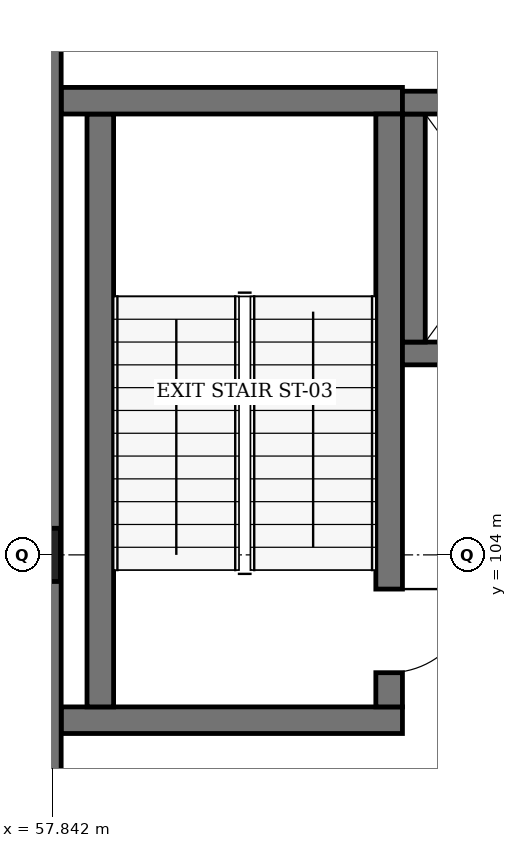
"""IFC4 building model, lengths in metres.
Left out: names, types, materials, properties, quantities, classifications, styles, units other than length and angle.
Written with IfcOpenShell. Run it as: python <this file> out.ifc"""

import sys

from ifc_helpers import new_model, si_unit, direction, frame, frame_2d, origin, origin_2d, place, context, subcontext, project, spatial, rectangle, extrude, element, fill, save


model = new_model("IFC4")
c1 = context("Model", 3, precision=1e-05, world=origin(), true_north=direction((0.0, 1.0)))
c2 = subcontext(c1, "Body", "Model", "MODEL_VIEW")
j1 = project(units=[si_unit("LENGTHUNIT", "METRE"), si_unit("PLANEANGLEUNIT", "RADIAN")], contexts=[c1])
p1 = place(None, origin())
s1 = spatial("IfcSite", under=j1, at=p1, CompositionType="ELEMENT")
p2 = place(p1, origin())
s2 = spatial("IfcBuilding", under=s1, at=p2, CompositionType="ELEMENT")
p3 = place(p2, origin())
s3 = spatial("IfcBuildingStorey", under=s2, at=p3, CompositionType="ELEMENT", Elevation=0.0)
p4 = place(p3, frame((57.6, 104.0, 0.0), z_axis=(0.0, 0.0, 1.0), x_axis=(1.0, 0.0, 0.0)))
e1 = element("IfcColumn", 1, at=p4, inside=s3, PredefinedType="COLUMN", context=c2, shape_type="SweptSolid", body=[
    extrude(rectangle(XDim=0.7, YDim=0.7, at=origin_2d()), origin(), (0.0, 0.0, 1.0), 4.8),
])
p5 = place(p3, frame((62.45, 101.825, 0.0), z_axis=(0.0, 0.0, 1.0), x_axis=(-1.0, 0.0, 0.0)))
e2 = element("IfcWall", 2, at=p5, inside=s3, PredefinedType="SOLIDWALL", context=c2, shape_type="SweptSolid", body=[
    extrude(rectangle(XDim=4.49, YDim=0.35, at=frame_2d((2.245, 0.0))), origin(), (0.0, 0.0, 1.0), 4.8),
])
p6 = place(p3, frame((58.475, 102.0, 0.0), z_axis=(0.0, 0.0, 1.0), x_axis=(0.0, 1.0, 0.0)))
e3 = element("IfcWall", 3, at=p6, inside=s3, PredefinedType="SOLIDWALL", context=c2, shape_type="SweptSolid", body=[
    extrude(rectangle(XDim=7.8, YDim=0.35, at=frame_2d((3.9, 0.0))), origin(), (0.0, 0.0, 1.0), 4.8),
])
p7 = place(p3, frame((57.96, 109.975, 0.0), z_axis=(0.0, 0.0, 1.0), x_axis=(1.0, 0.0, 0.0)))
e4 = element("IfcWall", 4, at=p7, inside=s3, PredefinedType="SOLIDWALL", context=c2, shape_type="SweptSolid", body=[
    extrude(rectangle(XDim=4.49, YDim=0.35, at=frame_2d((2.245, 0.0))), origin(), (0.0, 0.0, 1.0), 4.8),
])
p8 = place(p3, frame((62.275, 109.8, 0.0), z_axis=(0.0, 0.0, 1.0), x_axis=(0.0, -1.0, 0.0)))
e5 = element("IfcWall", 5, at=p8, inside=s3, PredefinedType="SOLIDWALL", context=c2, shape_type="SweptSolid", body=[
    extrude(rectangle(XDim=7.8, YDim=0.35, at=frame_2d((3.9, 0.0))), origin(), (0.0, 0.0, 1.0), 4.8),
])
p9 = place(p8, frame((6.25, 0.0, 0.0)))
e6 = element("IfcOpeningElement", 6, at=p9, cuts=e5, PredefinedType="OPENING", context=c2, shape_type="SweptSolid", body=[
    extrude(rectangle(XDim=1.1, YDim=2.15, at=frame_2d((0.55, 1.075))), frame((0.0, 0.195, 0.0), z_axis=(0.0, -1.0, 0.0), x_axis=(1.0, 0.0, 0.0)), (0.0, 0.0, 1.0), 0.39),
])
p10 = place(p3, frame((65.25, 106.65, 0.0), z_axis=(0.0, 0.0, 1.0), x_axis=(-1.0, 0.0, 0.0)))
e7 = element("IfcWall", 7, at=p10, inside=s3, PredefinedType="SOLIDWALL", context=c2, shape_type="SweptSolid", body=[
    extrude(rectangle(XDim=2.8, YDim=0.3, at=frame_2d((1.4, 0.0))), origin(), (0.0, 0.0, 1.0), 4.8),
])
p11 = place(p10, frame((0.825, 0.0, 0.0)))
e8 = element("IfcOpeningElement", 8, at=p11, cuts=e7, PredefinedType="OPENING", context=c2, shape_type="SweptSolid", body=[
    extrude(rectangle(XDim=1.15, YDim=2.1, at=frame_2d((0.575, 1.05))), frame((0.0, 0.17, 0.0), z_axis=(0.0, -1.0, 0.0), x_axis=(1.0, 0.0, 0.0)), (0.0, 0.0, 1.0), 0.34),
])
p12 = place(p3, frame((62.6, 106.8, 0.0), z_axis=(0.0, 0.0, 1.0), x_axis=(0.0, 1.0, 0.0)))
e9 = element("IfcWall", 9, at=p12, inside=s3, PredefinedType="SOLIDWALL", context=c2, shape_type="SweptSolid", body=[
    extrude(rectangle(XDim=3.0, YDim=0.3, at=frame_2d((1.5, 0.0))), origin(), (0.0, 0.0, 1.0), 4.8),
])
p13 = place(p3, frame((62.45, 109.95, 0.0), z_axis=(0.0, 0.0, 1.0), x_axis=(1.0, 0.0, 0.0)))
e10 = element("IfcWall", 10, at=p13, inside=s3, PredefinedType="SOLIDWALL", context=c2, shape_type="SweptSolid", body=[
    extrude(rectangle(XDim=2.8, YDim=0.3, at=frame_2d((1.4, 0.0))), origin(), (0.0, 0.0, 1.0), 4.8),
])
p14 = place(p3, frame((57.78, 87.8, 0.0), z_axis=(0.0, 0.0, 1.0), x_axis=(0.0, 1.0, 0.0)))
e11 = element("IfcWall", 11, at=p14, inside=s3, PredefinedType="SOLIDWALL", context=c2, shape_type="SweptSolid", body=[
    extrude(rectangle(XDim=24.0, YDim=0.36, at=frame_2d((12.0, 0.0))), origin(), (0.0, 0.0, 1.0), 4.54),
])
p15 = place(p9, origin())
e12 = element("IfcDoor", 12, at=p15, inside=s3, OperationType="SINGLE_SWING_LEFT", PredefinedType="DOOR", context=c2, shape_type="SweptSolid", body=[
    extrude(rectangle(XDim=1.1, YDim=2.15, at=frame_2d((0.55, 1.075))), frame((0.0, 0.025, 0.0), z_axis=(0.0, -1.0, 0.0), x_axis=(1.0, 0.0, 0.0)), (0.0, 0.0, 1.0), 0.05),
])
fill(e6, e12)
save(model, sys.argv[1])
